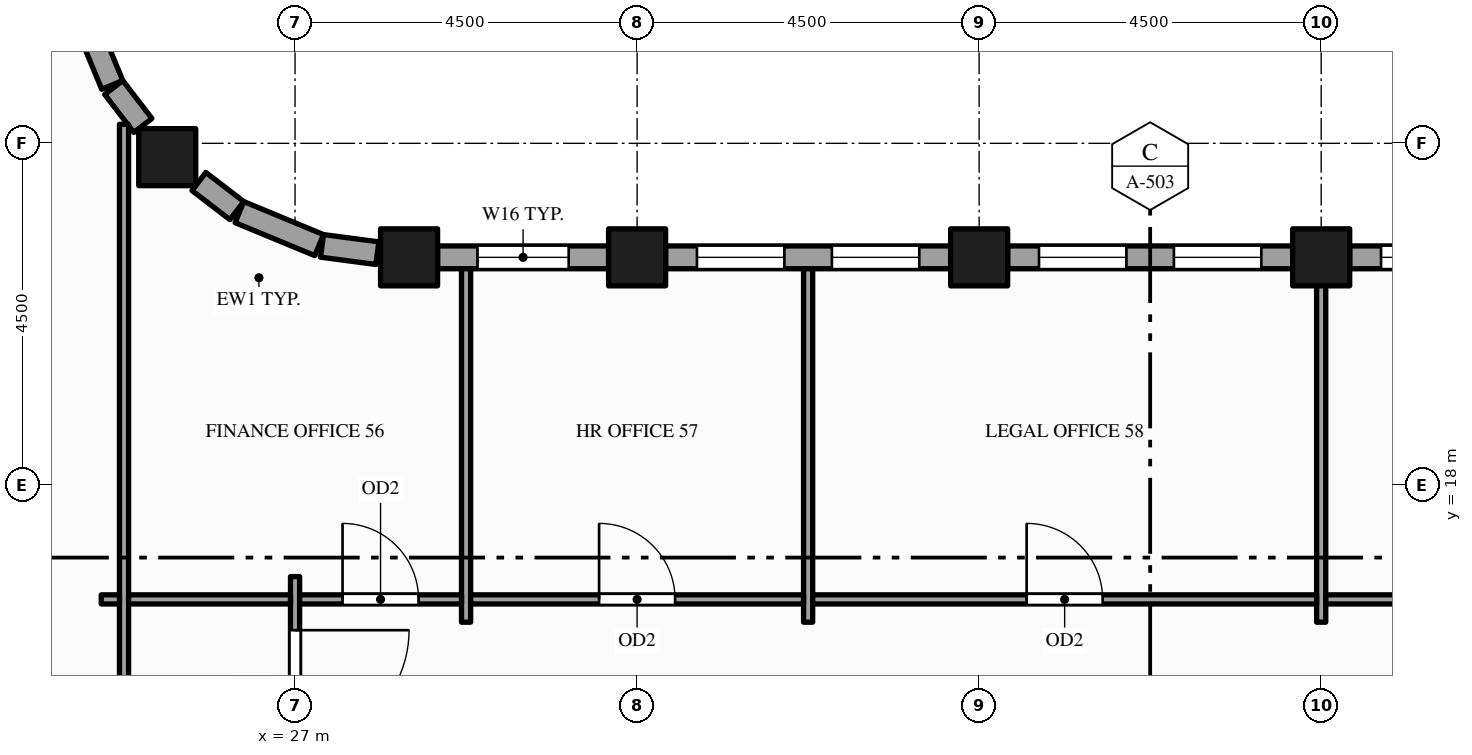
"""IFC4 building model, lengths in metres.
Left out: names, types, materials, properties, quantities, classifications, styles, units other than length and angle.
Written with IfcOpenShell. Run it as: python <this file> out.ifc"""

import sys

from ifc_helpers import new_model, si_unit, direction, frame, frame_2d, origin, origin_2d, place, context, subcontext, project, spatial, rectangle, hollow_rectangle, extrude, element, fill, save


model = new_model("IFC4")
c1 = context("Model", 3, precision=1e-05, world=origin(), true_north=direction((0.0, 1.0)))
c2 = subcontext(c1, "Body", "Model", "MODEL_VIEW")
j1 = project(units=[si_unit("LENGTHUNIT", "METRE"), si_unit("PLANEANGLEUNIT", "RADIAN")], contexts=[c1])
p1 = place(None, origin())
s1 = spatial("IfcSite", under=j1, at=p1, CompositionType="ELEMENT")
p2 = place(p1, origin())
s2 = spatial("IfcBuilding", under=s1, at=p2, CompositionType="ELEMENT")
p3 = place(p2, frame((0.0, 0.0, 199.0)))
s3 = spatial("IfcBuildingStorey", under=s2, at=p3, CompositionType="ELEMENT", Elevation=199.0)
for number, where, z_axis, x_axis in (
    (1, (25.318, 22.318, -0.15), (0.0, 0.0, 1.0), (1.0, 0.0, 0.0)),
    (2, (28.5, 21.0, -0.15), (0.0, 0.0, 1.0), (1.0, 0.0, 0.0)),
    (3, (31.5, 21.0, -0.15), (0.0, 0.0, 1.0), (1.0, 0.0, 0.0)),
    (4, (36.0, 21.0, -0.15), (0.0, 0.0, 1.0), (1.0, 0.0, 0.0)),
    (5, (40.5, 21.0, -0.15), (0.0, 0.0, 1.0), (1.0, 0.0, 0.0)),
):
    element("IfcColumn", number, at=place(p3, frame(where, z_axis=z_axis, x_axis=x_axis)), inside=s3, PredefinedType="COLUMN", context=c2, shape_type="SweptSolid", body=[
        extrude(hollow_rectangle(XDim=0.75, YDim=0.75, WallThickness=0.036, at=origin_2d()), origin(), (0.0, 0.0, 1.0), 4.0),
    ])
p4 = place(p3, frame((44.625, 21.0, 0.0), z_axis=(0.0, 0.0, 1.0), x_axis=(-1.0, 0.0, 0.0)))
e6 = element("IfcWall", 6, at=p4, inside=s3, PredefinedType="STANDARD", context=c2, shape_type="SweptSolid", body=[
    extrude(rectangle(XDim=3.75, YDim=0.3, at=frame_2d((1.875, 0.0))), origin(), (0.0, 0.0, 1.0), 2.87),
])
p5 = place(p4, frame((0.413, 0.0, 0.9)))
e7 = element("IfcOpeningElement", 7, at=p5, cuts=e6, PredefinedType="OPENING", context=c2, shape_type="SweptSolid", body=[
    extrude(rectangle(XDim=1.15, YDim=1.75, at=frame_2d((0.575, 0.875))), frame((0.0, 0.16, 0.0), z_axis=(0.0, -1.0, 0.0), x_axis=(1.0, 0.0, 0.0)), (0.0, 0.0, 1.0), 0.32),
])
p6 = place(p4, frame((2.188, 0.0, 0.9)))
e8 = element("IfcOpeningElement", 8, at=p6, cuts=e6, PredefinedType="OPENING", context=c2, shape_type="SweptSolid", body=[
    extrude(rectangle(XDim=1.15, YDim=1.75, at=frame_2d((0.575, 0.875))), frame((0.0, 0.16, 0.0), z_axis=(0.0, -1.0, 0.0), x_axis=(1.0, 0.0, 0.0)), (0.0, 0.0, 1.0), 0.32),
])
p7 = place(p3, frame((40.125, 21.0, 0.0), z_axis=(0.0, 0.0, 1.0), x_axis=(-1.0, 0.0, 0.0)))
e9 = element("IfcWall", 9, at=p7, inside=s3, PredefinedType="STANDARD", context=c2, shape_type="SweptSolid", body=[
    extrude(rectangle(XDim=3.75, YDim=0.3, at=frame_2d((1.875, 0.0))), origin(), (0.0, 0.0, 1.0), 2.87),
])
p8 = place(p7, frame((0.413, 0.0, 0.9)))
e10 = element("IfcOpeningElement", 10, at=p8, cuts=e9, PredefinedType="OPENING", context=c2, shape_type="SweptSolid", body=[
    extrude(rectangle(XDim=1.15, YDim=1.75, at=frame_2d((0.575, 0.875))), frame((0.0, 0.16, 0.0), z_axis=(0.0, -1.0, 0.0), x_axis=(1.0, 0.0, 0.0)), (0.0, 0.0, 1.0), 0.32),
])
p9 = place(p7, frame((2.188, 0.0, 0.9)))
e11 = element("IfcOpeningElement", 11, at=p9, cuts=e9, PredefinedType="OPENING", context=c2, shape_type="SweptSolid", body=[
    extrude(rectangle(XDim=1.15, YDim=1.75, at=frame_2d((0.575, 0.875))), frame((0.0, 0.16, 0.0), z_axis=(0.0, -1.0, 0.0), x_axis=(1.0, 0.0, 0.0)), (0.0, 0.0, 1.0), 0.32),
])
p10 = place(p3, frame((35.625, 21.0, 0.0), z_axis=(0.0, 0.0, 1.0), x_axis=(-1.0, 0.0, 0.0)))
e12 = element("IfcWall", 12, at=p10, inside=s3, PredefinedType="STANDARD", context=c2, shape_type="SweptSolid", body=[
    extrude(rectangle(XDim=3.75, YDim=0.3, at=frame_2d((1.875, 0.0))), origin(), (0.0, 0.0, 1.0), 2.87),
])
p11 = place(p10, frame((0.413, 0.0, 0.9)))
e13 = element("IfcOpeningElement", 13, at=p11, cuts=e12, PredefinedType="OPENING", context=c2, shape_type="SweptSolid", body=[
    extrude(rectangle(XDim=1.15, YDim=1.75, at=frame_2d((0.575, 0.875))), frame((0.0, 0.16, 0.0), z_axis=(0.0, -1.0, 0.0), x_axis=(1.0, 0.0, 0.0)), (0.0, 0.0, 1.0), 0.32),
])
p12 = place(p10, frame((2.188, 0.0, 0.9)))
e14 = element("IfcOpeningElement", 14, at=p12, cuts=e12, PredefinedType="OPENING", context=c2, shape_type="SweptSolid", body=[
    extrude(rectangle(XDim=1.15, YDim=1.75, at=frame_2d((0.575, 0.875))), frame((0.0, 0.16, 0.0), z_axis=(0.0, -1.0, 0.0), x_axis=(1.0, 0.0, 0.0)), (0.0, 0.0, 1.0), 0.32),
])
p13 = place(p3, frame((31.125, 21.0, 0.0), z_axis=(0.0, 0.0, 1.0), x_axis=(-1.0, 0.0, 0.0)))
e15 = element("IfcWall", 15, at=p13, inside=s3, PredefinedType="STANDARD", context=c2, shape_type="SweptSolid", body=[
    extrude(rectangle(XDim=2.25, YDim=0.3, at=frame_2d((1.125, 0.0))), origin(), (0.0, 0.0, 1.0), 2.87),
])
p14 = place(p13, frame((0.525, 0.0, 0.9)))
e16 = element("IfcOpeningElement", 16, at=p14, cuts=e15, PredefinedType="OPENING", context=c2, shape_type="SweptSolid", body=[
    extrude(rectangle(XDim=1.2, YDim=1.75, at=frame_2d((0.6, 0.875))), frame((0.0, 0.16, 0.0), z_axis=(0.0, -1.0, 0.0), x_axis=(1.0, 0.0, 0.0)), (0.0, 0.0, 1.0), 0.32),
])
p15 = place(p3, frame((28.083, 21.055, 0.0), z_axis=(0.0, 0.0, 1.0), x_axis=(-0.99142711513, 0.130660917588, 0.0)))
e17 = element("IfcWall", 17, at=p15, inside=s3, PredefinedType="STANDARD", context=c2, shape_type="SweptSolid", body=[
    extrude(rectangle(XDim=0.734, YDim=0.3, at=frame_2d((0.367, 0.0))), origin(), (0.0, 0.0, 1.0), 3.157),
])
p16 = place(p3, frame((27.317, 21.161, 0.0), z_axis=(0.0, 0.0, 1.0), x_axis=(-0.923914616768, 0.382598720491, 0.0)))
e18 = element("IfcWall", 18, at=p16, inside=s3, PredefinedType="STANDARD", context=c2, shape_type="SweptSolid", body=[
    extrude(rectangle(XDim=1.135, YDim=0.3, at=frame_2d((0.568, 0.0))), origin(), (0.0, 0.0, 1.0), 2.87),
])
p17 = place(p3, frame((26.234, 21.615, 0.0), z_axis=(0.0, 0.0, 1.0), x_axis=(-0.793575131083, 0.608472276547, 0.0)))
e19 = element("IfcWall", 19, at=p17, inside=s3, PredefinedType="STANDARD", context=c2, shape_type="SweptSolid", body=[
    extrude(rectangle(XDim=0.629, YDim=0.3, at=frame_2d((0.314, 0.0))), origin(), (0.0, 0.0, 1.0), 3.157),
])
p18 = place(p3, frame((24.998, 22.735, 0.0), z_axis=(0.0, 0.0, 1.0), x_axis=(-0.608472276547, 0.793575131083, 0.0)))
e20 = element("IfcWall", 20, at=p18, inside=s3, PredefinedType="STANDARD", context=c2, shape_type="SweptSolid", body=[
    extrude(rectangle(XDim=0.629, YDim=0.3, at=frame_2d((0.314, 0.0))), origin(), (0.0, 0.0, 1.0), 2.76),
])
p19 = place(p3, frame((24.595, 23.268, 0.0), z_axis=(0.0, 0.0, 1.0), x_axis=(-0.382598720491, 0.923914616768, 0.0)))
e21 = element("IfcWall", 21, at=p19, inside=s3, PredefinedType="STANDARD", context=c2, shape_type="SweptSolid", body=[
    extrude(rectangle(XDim=1.135, YDim=0.3, at=frame_2d((0.568, 0.0))), origin(), (0.0, 0.0, 1.0), 2.76),
])
p20 = place(p3, frame((24.75, -1.35, 0.0), z_axis=(0.0, 0.0, 1.0), x_axis=(0.0, 1.0, 0.0)))
e22 = element("IfcWall", 22, at=p20, inside=s3, PredefinedType="PARTITIONING", context=c2, shape_type="SweptSolid", body=[
    extrude(rectangle(XDim=24.101, YDim=0.12, at=frame_2d((12.05, 0.0))), origin(), (0.0, 0.0, 1.0), 2.76),
])
p21 = place(p20, frame((10.725, 0.0, 0.0)))
e23 = element("IfcOpeningElement", 23, at=p21, cuts=e22, PredefinedType="OPENING", context=c2, shape_type="SweptSolid", body=[
    extrude(rectangle(XDim=1.5, YDim=2.1, at=frame_2d((0.75, 1.05))), frame((0.0, 0.07, 0.0), z_axis=(0.0, -1.0, 0.0), x_axis=(1.0, 0.0, 0.0)), (0.0, 0.0, 1.0), 0.14),
])
p22 = place(p20, frame((14.625, 0.0, 0.0)))
e24 = element("IfcOpeningElement", 24, at=p22, cuts=e22, PredefinedType="OPENING", context=c2, shape_type="SweptSolid", body=[
    extrude(rectangle(XDim=1.2, YDim=2.1, at=frame_2d((0.6, 1.05))), frame((0.0, 0.07, 0.0), z_axis=(0.0, -1.0, 0.0), x_axis=(1.0, 0.0, 0.0)), (0.0, 0.0, 1.0), 0.14),
])
p23 = place(p3, frame((27.0, 2.7, 0.0), z_axis=(0.0, 0.0, 1.0), x_axis=(0.0, 1.0, 0.0)))
e25 = element("IfcWall", 25, at=p23, inside=s3, PredefinedType="PARTITIONING", context=c2, shape_type="SweptSolid", body=[
    extrude(rectangle(XDim=14.1, YDim=0.12, at=frame_2d((7.05, 0.0))), origin(), (0.0, 0.0, 1.0), 2.87),
])
p24 = place(p23, frame((0.705, 0.0, 0.0)))
e26 = element("IfcOpeningElement", 26, at=p24, cuts=e25, PredefinedType="OPENING", context=c2, shape_type="SweptSolid", body=[
    extrude(rectangle(XDim=1.5, YDim=2.1, at=frame_2d((0.75, 1.05))), frame((0.0, 0.07, 0.0), z_axis=(0.0, -1.0, 0.0), x_axis=(1.0, 0.0, 0.0)), (0.0, 0.0, 1.0), 0.14),
])
p25 = place(p23, frame((11.895, 0.0, 0.0)))
e27 = element("IfcOpeningElement", 27, at=p25, cuts=e25, PredefinedType="OPENING", context=c2, shape_type="SweptSolid", body=[
    extrude(rectangle(XDim=1.5, YDim=2.1, at=frame_2d((0.75, 1.05))), frame((0.0, 0.07, 0.0), z_axis=(0.0, -1.0, 0.0), x_axis=(1.0, 0.0, 0.0)), (0.0, 0.0, 1.0), 0.14),
])
for number, where, z_axis, x_axis in (
    (28, (29.25, 16.2, 0.0), (0.0, 0.0, 1.0), (0.0, 1.0, 0.0)),
    (29, (33.75, 16.2, 0.0), (0.0, 0.0, 1.0), (0.0, 1.0, 0.0)),
    (30, (40.5, 16.2, 0.0), (0.0, 0.0, 1.0), (0.0, 1.0, 0.0)),
):
    element("IfcWall", number, at=place(p3, frame(where, z_axis=z_axis, x_axis=x_axis)), inside=s3, PredefinedType="PARTITIONING", context=c2, shape_type="SweptSolid", body=[
        extrude(rectangle(XDim=4.65, YDim=0.12, at=frame_2d((2.325, 0.0))), origin(), (0.0, 0.0, 1.0), 2.87),
    ])
p26 = place(p3, frame((24.45, 16.5, 0.0), z_axis=(0.0, 0.0, 1.0), x_axis=(1.0, 0.0, 0.0)))
e31 = element("IfcWall", 31, at=p26, inside=s3, PredefinedType="PARTITIONING", context=c2, shape_type="SweptSolid", body=[
    extrude(rectangle(XDim=0.24, YDim=0.12, at=frame_2d((0.12, 0.0))), origin(), (0.0, 0.0, 1.0), 2.76),
])
p27 = place(p3, frame((24.81, 16.5, 0.0), z_axis=(0.0, 0.0, 1.0), x_axis=(1.0, 0.0, 0.0)))
e32 = element("IfcWall", 32, at=p27, inside=s3, PredefinedType="PARTITIONING", context=c2, shape_type="SweptSolid", body=[
    extrude(rectangle(XDim=2.13, YDim=0.12, at=frame_2d((1.065, 0.0))), origin(), (0.0, 0.0, 1.0), 2.76),
])
p28 = place(p3, frame((27.06, 16.5, 0.0), z_axis=(0.0, 0.0, 1.0), x_axis=(1.0, 0.0, 0.0)))
e33 = element("IfcWall", 33, at=p28, inside=s3, PredefinedType="PARTITIONING", context=c2, shape_type="SweptSolid", body=[
    extrude(rectangle(XDim=2.13, YDim=0.12, at=frame_2d((1.065, 0.0))), origin(), (0.0, 0.0, 1.0), 2.87),
])
p29 = place(p28, frame((0.565, 0.0, 0.0)))
e34 = element("IfcOpeningElement", 34, at=p29, cuts=e33, PredefinedType="OPENING", context=c2, shape_type="SweptSolid", body=[
    extrude(rectangle(XDim=1.0, YDim=2.1, at=frame_2d((0.5, 1.05))), frame((0.0, 0.07, 0.0), z_axis=(0.0, -1.0, 0.0), x_axis=(1.0, 0.0, 0.0)), (0.0, 0.0, 1.0), 0.14),
])
p30 = place(p3, frame((29.31, 16.5, 0.0), z_axis=(0.0, 0.0, 1.0), x_axis=(1.0, 0.0, 0.0)))
e35 = element("IfcWall", 35, at=p30, inside=s3, PredefinedType="PARTITIONING", context=c2, shape_type="SweptSolid", body=[
    extrude(rectangle(XDim=4.38, YDim=0.12, at=frame_2d((2.19, 0.0))), origin(), (0.0, 0.0, 1.0), 2.87),
])
p31 = place(p30, frame((1.69, 0.0, 0.0)))
e36 = element("IfcOpeningElement", 36, at=p31, cuts=e35, PredefinedType="OPENING", context=c2, shape_type="SweptSolid", body=[
    extrude(rectangle(XDim=1.0, YDim=2.1, at=frame_2d((0.5, 1.05))), frame((0.0, 0.07, 0.0), z_axis=(0.0, -1.0, 0.0), x_axis=(1.0, 0.0, 0.0)), (0.0, 0.0, 1.0), 0.14),
])
p32 = place(p3, frame((33.81, 16.5, 0.0), z_axis=(0.0, 0.0, 1.0), x_axis=(1.0, 0.0, 0.0)))
e37 = element("IfcWall", 37, at=p32, inside=s3, PredefinedType="PARTITIONING", context=c2, shape_type="SweptSolid", body=[
    extrude(rectangle(XDim=6.63, YDim=0.12, at=frame_2d((3.315, 0.0))), origin(), (0.0, 0.0, 1.0), 2.87),
])
p33 = place(p32, frame((2.815, 0.0, 0.0)))
e38 = element("IfcOpeningElement", 38, at=p33, cuts=e37, PredefinedType="OPENING", context=c2, shape_type="SweptSolid", body=[
    extrude(rectangle(XDim=1.0, YDim=2.1, at=frame_2d((0.5, 1.05))), frame((0.0, 0.07, 0.0), z_axis=(0.0, -1.0, 0.0), x_axis=(1.0, 0.0, 0.0)), (0.0, 0.0, 1.0), 0.14),
])
p34 = place(p3, frame((40.56, 16.5, 0.0), z_axis=(0.0, 0.0, 1.0), x_axis=(1.0, 0.0, 0.0)))
e39 = element("IfcWall", 39, at=p34, inside=s3, PredefinedType="PARTITIONING", context=c2, shape_type="SweptSolid", body=[
    extrude(rectangle(XDim=4.38, YDim=0.12, at=frame_2d((2.19, 0.0))), origin(), (0.0, 0.0, 1.0), 2.87),
])
p35 = place(p34, frame((1.69, 0.0, 0.0)))
e40 = element("IfcOpeningElement", 40, at=p35, cuts=e39, PredefinedType="OPENING", context=c2, shape_type="SweptSolid", body=[
    extrude(rectangle(XDim=1.0, YDim=2.1, at=frame_2d((0.5, 1.05))), frame((0.0, 0.07, 0.0), z_axis=(0.0, -1.0, 0.0), x_axis=(1.0, 0.0, 0.0)), (0.0, 0.0, 1.0), 0.14),
])
p36 = place(p6, origin())
e41 = element("IfcWindow", 41, at=p36, inside=s3, PartitioningType="SINGLE_PANEL", PredefinedType="WINDOW", context=c2, shape_type="SweptSolid", body=[
    extrude(rectangle(XDim=1.15, YDim=1.75, at=frame_2d((0.575, 0.875))), frame((0.0, 0.03, 0.0), z_axis=(0.0, -1.0, 0.0), x_axis=(1.0, 0.0, 0.0)), (0.0, 0.0, 1.0), 0.06),
])
fill(e8, e41)
p37 = place(p8, origin())
e42 = element("IfcWindow", 42, at=p37, inside=s3, PartitioningType="SINGLE_PANEL", PredefinedType="WINDOW", context=c2, shape_type="SweptSolid", body=[
    extrude(rectangle(XDim=1.15, YDim=1.75, at=frame_2d((0.575, 0.875))), frame((0.0, 0.03, 0.0), z_axis=(0.0, -1.0, 0.0), x_axis=(1.0, 0.0, 0.0)), (0.0, 0.0, 1.0), 0.06),
])
fill(e10, e42)
p38 = place(p9, origin())
e43 = element("IfcWindow", 43, at=p38, inside=s3, PartitioningType="SINGLE_PANEL", PredefinedType="WINDOW", context=c2, shape_type="SweptSolid", body=[
    extrude(rectangle(XDim=1.15, YDim=1.75, at=frame_2d((0.575, 0.875))), frame((0.0, 0.03, 0.0), z_axis=(0.0, -1.0, 0.0), x_axis=(1.0, 0.0, 0.0)), (0.0, 0.0, 1.0), 0.06),
])
fill(e11, e43)
p39 = place(p11, origin())
e44 = element("IfcWindow", 44, at=p39, inside=s3, PartitioningType="SINGLE_PANEL", PredefinedType="WINDOW", context=c2, shape_type="SweptSolid", body=[
    extrude(rectangle(XDim=1.15, YDim=1.75, at=frame_2d((0.575, 0.875))), frame((0.0, 0.03, 0.0), z_axis=(0.0, -1.0, 0.0), x_axis=(1.0, 0.0, 0.0)), (0.0, 0.0, 1.0), 0.06),
])
fill(e13, e44)
p40 = place(p12, origin())
e45 = element("IfcWindow", 45, at=p40, inside=s3, PartitioningType="SINGLE_PANEL", PredefinedType="WINDOW", context=c2, shape_type="SweptSolid", body=[
    extrude(rectangle(XDim=1.15, YDim=1.75, at=frame_2d((0.575, 0.875))), frame((0.0, 0.03, 0.0), z_axis=(0.0, -1.0, 0.0), x_axis=(1.0, 0.0, 0.0)), (0.0, 0.0, 1.0), 0.06),
])
fill(e14, e45)
p41 = place(p14, origin())
e46 = element("IfcWindow", 46, at=p41, inside=s3, PartitioningType="SINGLE_PANEL", PredefinedType="WINDOW", context=c2, shape_type="SweptSolid", body=[
    extrude(rectangle(XDim=1.2, YDim=1.75, at=frame_2d((0.6, 0.875))), frame((0.0, 0.03, 0.0), z_axis=(0.0, -1.0, 0.0), x_axis=(1.0, 0.0, 0.0)), (0.0, 0.0, 1.0), 0.06),
])
fill(e16, e46)
p42 = place(p25, origin())
e47 = element("IfcDoor", 47, at=p42, inside=s3, OperationType="SINGLE_SWING_RIGHT", PredefinedType="DOOR", context=c2, shape_type="SweptSolid", body=[
    extrude(rectangle(XDim=1.5, YDim=2.1, at=frame_2d((0.75, 1.05))), frame((0.0, 0.025, 0.0), z_axis=(0.0, -1.0, 0.0), x_axis=(1.0, 0.0, 0.0)), (0.0, 0.0, 1.0), 0.05),
])
fill(e27, e47)
p43 = place(p29, origin())
e48 = element("IfcDoor", 48, at=p43, inside=s3, OperationType="SINGLE_SWING_LEFT", PredefinedType="DOOR", context=c2, shape_type="SweptSolid", body=[
    extrude(rectangle(XDim=1.0, YDim=2.1, at=frame_2d((0.5, 1.05))), frame((0.0, 0.025, 0.0), z_axis=(0.0, -1.0, 0.0), x_axis=(1.0, 0.0, 0.0)), (0.0, 0.0, 1.0), 0.05),
])
fill(e34, e48)
p44 = place(p31, origin())
e49 = element("IfcDoor", 49, at=p44, inside=s3, OperationType="SINGLE_SWING_LEFT", PredefinedType="DOOR", context=c2, shape_type="SweptSolid", body=[
    extrude(rectangle(XDim=1.0, YDim=2.1, at=frame_2d((0.5, 1.05))), frame((0.0, 0.025, 0.0), z_axis=(0.0, -1.0, 0.0), x_axis=(1.0, 0.0, 0.0)), (0.0, 0.0, 1.0), 0.05),
])
fill(e36, e49)
p45 = place(p33, origin())
e50 = element("IfcDoor", 50, at=p45, inside=s3, OperationType="SINGLE_SWING_LEFT", PredefinedType="DOOR", context=c2, shape_type="SweptSolid", body=[
    extrude(rectangle(XDim=1.0, YDim=2.1, at=frame_2d((0.5, 1.05))), frame((0.0, 0.025, 0.0), z_axis=(0.0, -1.0, 0.0), x_axis=(1.0, 0.0, 0.0)), (0.0, 0.0, 1.0), 0.05),
])
fill(e38, e50)
save(model, sys.argv[1])
